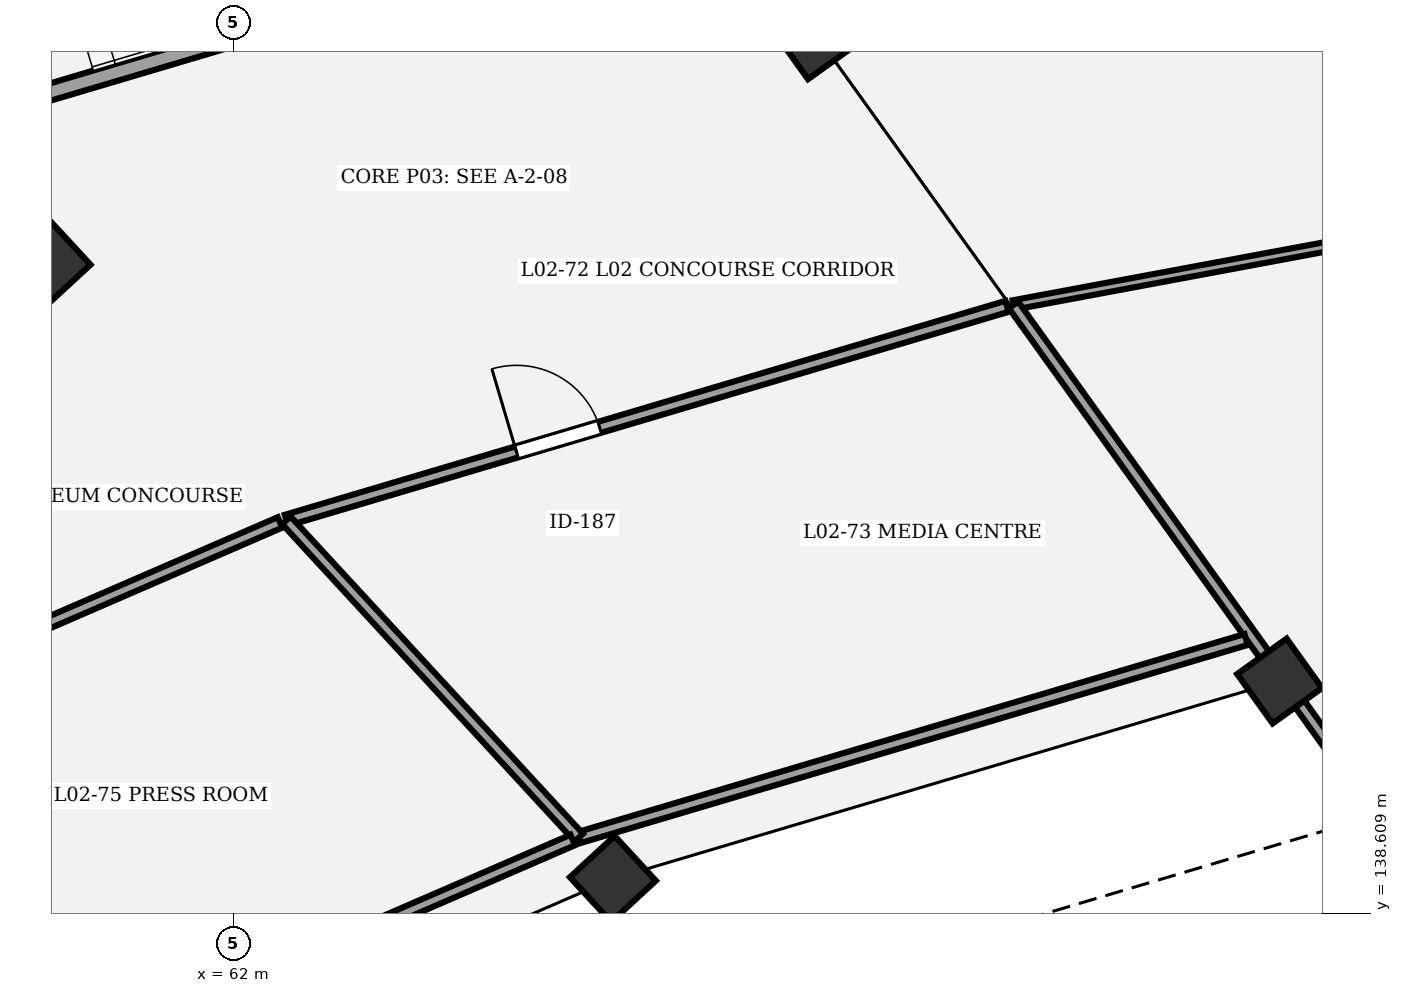
"""IFC4 building model, lengths in metres.
Left out: names, types, materials, properties, quantities, classifications, styles, units other than length and angle.
Written with IfcOpenShell. Run it as: python <this file> out.ifc"""

import sys

from ifc_helpers import new_model, si_unit, direction, frame, frame_2d, origin, origin_2d, place, context, subcontext, project, spatial, rectangle, extrude, element, fill, save


model = new_model("IFC4")
c1 = context("Model", 3, precision=1e-05, world=origin(), true_north=direction((0.0, 1.0)))
c2 = subcontext(c1, "Body", "Model", "MODEL_VIEW")
j1 = project(units=[si_unit("LENGTHUNIT", "METRE"), si_unit("PLANEANGLEUNIT", "RADIAN")], contexts=[c1])
p1 = place(None, origin())
s1 = spatial("IfcSite", under=j1, at=p1, CompositionType="ELEMENT")
p2 = place(p1, origin())
s2 = spatial("IfcBuilding", under=s1, at=p2, CompositionType="ELEMENT")
p3 = place(p2, frame((0.0, 0.0, 10.2)))
s3 = spatial("IfcBuildingStorey", under=s2, at=p3, CompositionType="ELEMENT", Elevation=10.2)
p4 = place(p3, frame((75.77, 141.667, 0.0), z_axis=(0.0, 0.0, 1.0), x_axis=(-0.582974127943, 0.812490717577, 0.0)))
e1 = element("IfcColumn", 1, at=p4, inside=s3, PredefinedType="COLUMN", context=c2, shape_type="SweptSolid", body=[
    extrude(rectangle(XDim=0.8, YDim=0.8, at=origin_2d()), origin(), (0.0, 0.0, 1.0), 4.5),
])
p5 = place(p3, frame((69.662, 150.177, 0.0), z_axis=(0.0, 0.0, 1.0), x_axis=(-0.582974127943, 0.812490717577, 0.0)))
e2 = element("IfcColumn", 2, at=p5, inside=s3, PredefinedType="COLUMN", context=c2, shape_type="SweptSolid", body=[
    extrude(rectangle(XDim=0.85, YDim=0.85, at=origin_2d()), origin(), (0.0, 0.0, 1.0), 4.5),
])
p6 = place(p3, frame((66.997, 139.062, 0.0), z_axis=(0.0, 0.0, 1.0), x_axis=(-0.677903094969, 0.735151272753, 0.0)))
e3 = element("IfcColumn", 3, at=p6, inside=s3, PredefinedType="COLUMN", context=c2, shape_type="SweptSolid", body=[
    extrude(rectangle(XDim=0.8, YDim=0.8, at=origin_2d()), origin(), (0.0, 0.0, 1.0), 4.5),
])
p7 = place(p3, frame((59.524, 147.168, 0.0), z_axis=(0.0, 0.0, 1.0), x_axis=(-0.677903094969, 0.735151272753, 0.0)))
e4 = element("IfcColumn", 4, at=p7, inside=s3, PredefinedType="COLUMN", context=c2, shape_type="SweptSolid", body=[
    extrude(rectangle(XDim=0.85, YDim=0.85, at=origin_2d()), origin(), (0.0, 0.0, 1.0), 4.5),
])
p8 = place(p3, frame((58.15, 148.986, 0.0), z_axis=(0.0, 0.0, 1.0), x_axis=(0.958665631999, 0.284535069937, 0.0)))
e5 = element("IfcWall", 5, at=p8, inside=s3, PredefinedType="SHEAR", context=c2, shape_type="SweptSolid", body=[
    extrude(rectangle(XDim=8.54, YDim=0.22, at=frame_2d((4.27, 0.0))), origin(), (0.0, 0.0, 1.0), 4.25),
])
p9 = place(p8, frame((0.3, 0.0, 0.0)))
e6 = element("IfcOpeningElement", 6, at=p9, cuts=e5, PredefinedType="OPENING", context=c2, shape_type="SweptSolid", body=[
    extrude(rectangle(XDim=1.15, YDim=2.15, at=frame_2d((0.575, 1.075))), frame((0.0, 0.12, 0.0), z_axis=(0.0, -1.0, 0.0), x_axis=(1.0, 0.0, 0.0)), (0.0, 0.0, 1.0), 0.24),
])
p10 = place(p3, frame((72.268, 146.614, 0.0), z_axis=(0.0, 0.0, 1.0), x_axis=(0.983097372707, 0.183083466695, 0.0)))
e7 = element("IfcWall", 7, at=p10, inside=s3, PredefinedType="PARTITIONING", context=c2, shape_type="SweptSolid", body=[
    extrude(rectangle(XDim=11.035, YDim=0.125, at=frame_2d((5.517, 0.0))), origin(), (0.0, 0.0, 1.0), 3.25),
])
p11 = place(p10, frame((4.967, 0.0, 0.0)))
e8 = element("IfcOpeningElement", 8, at=p11, cuts=e7, PredefinedType="OPENING", context=c2, shape_type="SweptSolid", body=[
    extrude(rectangle(XDim=1.1, YDim=2.1, at=frame_2d((0.55, 1.05))), frame((0.0, 0.073, 0.0), z_axis=(0.0, -1.0, 0.0), x_axis=(1.0, 0.0, 0.0)), (0.0, 0.0, 1.0), 0.145),
])
p12 = place(p3, frame((62.701, 143.781, 0.0), z_axis=(0.0, 0.0, 1.0), x_axis=(0.958655809656, 0.284568161629, 0.0)))
e9 = element("IfcWall", 9, at=p12, inside=s3, PredefinedType="PARTITIONING", context=c2, shape_type="SweptSolid", body=[
    extrude(rectangle(XDim=9.891, YDim=0.15, at=frame_2d((4.946, 0.0))), origin(), (0.0, 0.0, 1.0), 3.25),
])
p13 = place(p12, frame((3.159, 0.0, 0.0)))
e10 = element("IfcOpeningElement", 10, at=p13, cuts=e9, PredefinedType="OPENING", context=c2, shape_type="SweptSolid", body=[
    extrude(rectangle(XDim=1.14, YDim=2.1, at=frame_2d((0.57, 1.05))), frame((0.0, 0.085, 0.0), z_axis=(0.0, -1.0, 0.0), x_axis=(1.0, 0.0, 0.0)), (0.0, 0.0, 1.0), 0.17),
])
p14 = place(p3, frame((54.315, 140.154, 0.0), z_axis=(0.0, 0.0, 1.0), x_axis=(0.917494590455, 0.397748257677, 0.0)))
e11 = element("IfcWall", 11, at=p14, inside=s3, PredefinedType="PARTITIONING", context=c2, shape_type="SweptSolid", body=[
    extrude(rectangle(XDim=9.049, YDim=0.15, at=frame_2d((4.525, 0.0))), origin(), (0.0, 0.0, 1.0), 3.25),
])
p15 = place(p14, frame((1.766, 0.0, 0.0)))
e12 = element("IfcOpeningElement", 12, at=p15, cuts=e11, PredefinedType="OPENING", context=c2, shape_type="SweptSolid", body=[
    extrude(rectangle(XDim=1.18, YDim=2.1, at=frame_2d((0.59, 1.05))), frame((0.0, 0.085, 0.0), z_axis=(0.0, -1.0, 0.0), x_axis=(1.0, 0.0, 0.0)), (0.0, 0.0, 1.0), 0.17),
])
p16 = place(p3, frame((76.68, 140.467, 0.0), z_axis=(0.0, 0.0, 1.0), x_axis=(-0.583043547447, 0.812440903562, 0.0)))
e13 = element("IfcWall", 13, at=p16, inside=s3, PredefinedType="PARTITIONING", context=c2, shape_type="SweptSolid", body=[
    extrude(rectangle(XDim=7.567, YDim=0.15, at=frame_2d((3.783, 0.0))), origin(), (0.0, 0.0, 1.0), 3.25),
])
p17 = place(p3, frame((75.329, 142.212, 0.0), z_axis=(0.0, 0.0, 1.0), x_axis=(-0.958661639872, -0.284548520005, 0.0)))
e14 = element("IfcWall", 14, at=p17, inside=s3, PredefinedType="PARTITIONING", context=c2, shape_type="SweptSolid", body=[
    extrude(rectangle(XDim=9.157, YDim=0.15, at=frame_2d((4.579, 0.0))), origin(), (0.0, 0.0, 1.0), 3.25),
])
p18 = place(p3, frame((66.55, 139.607, 0.0), z_axis=(0.0, 0.0, 1.0), x_axis=(-0.677844218495, 0.735205559999, 0.0)))
e15 = element("IfcWall", 15, at=p18, inside=s3, PredefinedType="PARTITIONING", context=c2, shape_type="SweptSolid", body=[
    extrude(rectangle(XDim=5.678, YDim=0.15, at=frame_2d((2.839, 0.0))), origin(), (0.0, 0.0, 1.0), 3.25),
])
p19 = place(p3, frame((66.47, 139.576, 0.0), z_axis=(0.0, 0.0, 1.0), x_axis=(-0.917493946853, -0.397749742286, 0.0)))
e16 = element("IfcWall", 16, at=p19, inside=s3, PredefinedType="PARTITIONING", context=c2, shape_type="SweptSolid", body=[
    extrude(rectangle(XDim=8.377, YDim=0.15, at=frame_2d((4.188, 0.0))), origin(), (0.0, 0.0, 1.0), 3.25),
])
p20 = place(p13, origin())
e17 = element("IfcDoor", 17, at=p20, inside=s3, OperationType="SINGLE_SWING_LEFT", PredefinedType="DOOR", context=c2, shape_type="SweptSolid", body=[
    extrude(rectangle(XDim=1.14, YDim=2.1, at=frame_2d((0.57, 1.05))), frame((0.0, 0.025, 0.0), z_axis=(0.0, -1.0, 0.0), x_axis=(1.0, 0.0, 0.0)), (0.0, 0.0, 1.0), 0.05),
])
fill(e10, e17)
save(model, sys.argv[1])
